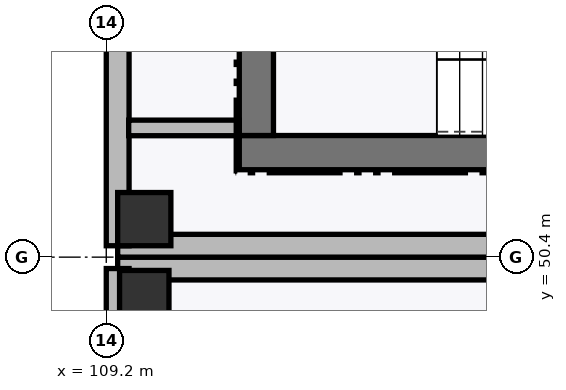
"""IFC4 building model, lengths in metres.
Left out: names, types, materials, properties, quantities, classifications, styles, units other than length and angle.
Written with IfcOpenShell. Run it as: python <this file> out.ifc"""

import sys

from ifc_helpers import new_model, si_unit, direction, frame, frame_2d, origin, origin_2d, place, context, subcontext, project, spatial, rectangle, extrude, element, save


model = new_model("IFC4")
c1 = context("Model", 3, precision=1e-05, world=origin(), true_north=direction((0.0, 1.0)))
c2 = subcontext(c1, "Body", "Model", "MODEL_VIEW")
j1 = project(units=[si_unit("LENGTHUNIT", "METRE"), si_unit("PLANEANGLEUNIT", "RADIAN")], contexts=[c1])
p1 = place(None, origin())
s1 = spatial("IfcSite", under=j1, at=p1, CompositionType="ELEMENT")
p2 = place(p1, origin())
s2 = spatial("IfcBuilding", under=s1, at=p2, CompositionType="ELEMENT")
p3 = place(p2, origin())
s3 = spatial("IfcBuildingStorey", under=s2, at=p3, CompositionType="ELEMENT", Elevation=0.0)
p4 = place(p3, frame((109.7, 49.9, 0.0), z_axis=(0.0, 0.0, 1.0), x_axis=(1.0, 0.0, 0.0)))
e1 = element("IfcColumn", 1, at=p4, inside=s3, PredefinedType="COLUMN", context=c2, shape_type="SweptSolid", body=[
    extrude(rectangle(XDim=0.65, YDim=0.65, at=origin_2d()), origin(), (0.0, 0.0, 1.0), 6.0),
])
p5 = place(p3, frame((109.7, 50.9, 0.0), z_axis=(0.0, 0.0, 1.0), x_axis=(1.0, 0.0, 0.0)))
e2 = element("IfcColumn", 2, at=p5, inside=s3, PredefinedType="COLUMN", context=c2, shape_type="SweptSolid", body=[
    extrude(rectangle(XDim=0.7, YDim=0.7, at=origin_2d()), origin(), (0.0, 0.0, 1.0), 6.0),
])
p6 = place(p3, frame((117.6, 50.25, 0.0), z_axis=(0.0, 0.0, 1.0), x_axis=(-1.0, 0.0, 0.0)))
e3 = element("IfcWall", 3, at=p6, inside=s3, PredefinedType="STANDARD", context=c2, shape_type="SweptSolid", body=[
    extrude(rectangle(XDim=8.25, YDim=0.3, at=frame_2d((4.125, 0.0))), origin(), (0.0, 0.0, 1.0), 5.231),
])
p7 = place(p3, frame((109.35, 50.25, 0.0), z_axis=(0.0, 0.0, 1.0), x_axis=(0.0, -1.0, 0.0)))
e4 = element("IfcWall", 4, at=p7, inside=s3, PredefinedType="STANDARD", context=c2, shape_type="SweptSolid", body=[
    extrude(rectangle(XDim=8.35, YDim=0.3, at=frame_2d((4.175, 0.0))), origin(), (0.0, 0.0, 1.0), 5.231),
])
p8 = place(p3, frame((109.35, 50.55, 0.0), z_axis=(0.0, 0.0, 1.0), x_axis=(1.0, 0.0, 0.0)))
e5 = element("IfcWall", 5, at=p8, inside=s3, PredefinedType="STANDARD", context=c2, shape_type="SweptSolid", body=[
    extrude(rectangle(XDim=8.378, YDim=0.3, at=frame_2d((4.189, 0.0))), origin(), (0.0, 0.0, 1.0), 5.297),
])
p9 = place(p3, frame((109.35, 58.181, 0.0), z_axis=(0.0, 0.0, 1.0), x_axis=(0.0, -1.0, 0.0)))
e6 = element("IfcWall", 6, at=p9, inside=s3, PredefinedType="STANDARD", context=c2, shape_type="SweptSolid", body=[
    extrude(rectangle(XDim=7.631, YDim=0.3, at=frame_2d((3.815, 0.0))), origin(), (0.0, 0.0, 1.0), 5.231),
])
p10 = place(p3, frame((110.95, 51.775, 0.0), z_axis=(0.0, 0.0, 1.0), x_axis=(1.0, 0.0, 0.0)))
e7 = element("IfcWall", 7, at=p10, inside=s3, PredefinedType="SHEAR", context=c2, shape_type="SweptSolid", body=[
    extrude(rectangle(XDim=11.1, YDim=0.45, at=frame_2d((5.55, 0.0))), origin(), (0.0, 0.0, 1.0), 5.745),
])
p11 = place(p3, frame((111.175, 56.2, 0.0), z_axis=(0.0, 0.0, 1.0), x_axis=(0.0, -1.0, 0.0)))
e8 = element("IfcWall", 8, at=p11, inside=s3, PredefinedType="SHEAR", context=c2, shape_type="SweptSolid", body=[
    extrude(rectangle(XDim=4.2, YDim=0.45, at=frame_2d((2.1, 0.0))), origin(), (0.0, 0.0, 1.0), 5.745),
])
p12 = place(p11, frame((1.35, 0.0, 0.0)))
e9 = element("IfcOpeningElement", 9, at=p12, cuts=e8, PredefinedType="OPENING", context=c2, shape_type="SweptSolid", body=[
    extrude(rectangle(XDim=1.5, YDim=2.15, at=frame_2d((0.75, 1.075))), frame((0.0, 0.235, 0.0), z_axis=(0.0, -1.0, 0.0), x_axis=(1.0, 0.0, 0.0)), (0.0, 0.0, 1.0), 0.47),
])
p13 = place(p3, frame((109.495, 52.1, 0.0), z_axis=(0.0, 0.0, 1.0), x_axis=(1.0, 0.0, 0.0)))
e10 = element("IfcWall", 10, at=p13, inside=s3, PredefinedType="PARTITIONING", context=c2, shape_type="SweptSolid", body=[
    extrude(rectangle(XDim=1.455, YDim=0.205, at=frame_2d((0.728, 0.0))), origin(), (0.0, 0.0, 1.0), 5.745),
])
save(model, sys.argv[1])
